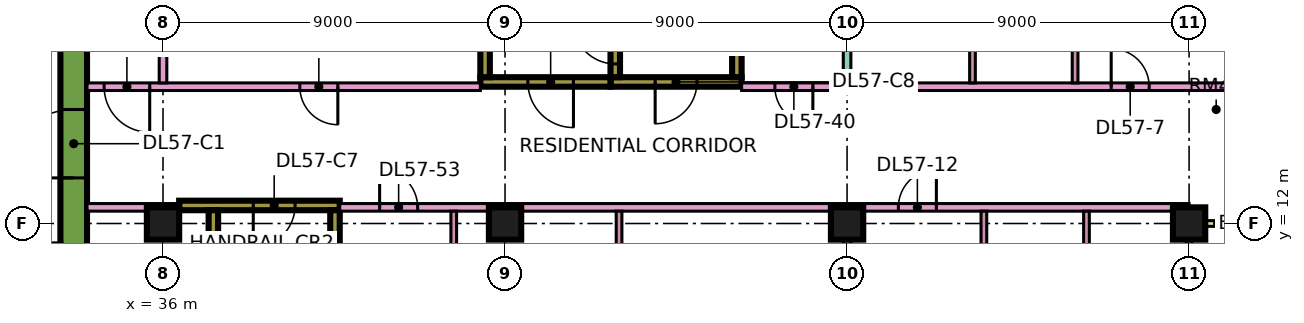
"""IFC4 building model, lengths in metres.
Left out: names, types, materials, properties, quantities, classifications, styles, units other than length and angle.
Written with IfcOpenShell. Run it as: python <this file> out.ifc"""

import sys

from ifc_helpers import new_model, si_unit, direction, frame, frame_2d, origin, origin_2d, place, context, subcontext, project, spatial, rectangle, extrude, element, fill, save


model = new_model("IFC4")
c1 = context("Model", 3, precision=1e-05, world=origin(), true_north=direction((0.0, 1.0)))
c2 = subcontext(c1, "Body", "Model", "MODEL_VIEW")
j1 = project(units=[si_unit("LENGTHUNIT", "METRE"), si_unit("PLANEANGLEUNIT", "RADIAN")], contexts=[c1])
p1 = place(None, origin())
s1 = spatial("IfcSite", under=j1, at=p1, CompositionType="ELEMENT")
p2 = place(p1, origin())
s2 = spatial("IfcBuilding", under=s1, at=p2, CompositionType="ELEMENT")
p3 = place(p2, frame((0.0, 0.0, 241.65)))
s3 = spatial("IfcBuildingStorey", under=s2, at=p3, CompositionType="ELEMENT", Elevation=241.65)
for number, where, z_axis, x_axis in (
    (1, (36.0, 12.0, 0.0), (0.0, 0.0, 1.0), (1.0, 0.0, 0.0)),
    (2, (45.0, 12.0, 0.0), (0.0, 0.0, 1.0), (1.0, 0.0, 0.0)),
    (3, (54.0, 12.0, 0.0), (0.0, 0.0, 1.0), (1.0, 0.0, 0.0)),
    (4, (63.0, 12.0, 0.0), (0.0, 0.0, 1.0), (1.0, 0.0, 0.0)),
):
    element("IfcColumn", number, at=place(p3, frame(where, z_axis=z_axis, x_axis=x_axis)), inside=s3, PredefinedType="COLUMN", context=c2, shape_type="SweptSolid", body=[
        extrude(rectangle(XDim=0.85, YDim=0.85, at=origin_2d()), origin(), (0.0, 0.0, 1.0), 3.75),
    ])
p4 = place(p3, frame((33.65, 7.7, 0.0), z_axis=(0.0, 0.0, 1.0), x_axis=(0.0, 1.0, 0.0)))
e5 = element("IfcWall", 5, at=p4, inside=s3, PredefinedType="SHEAR", context=c2, shape_type="SweptSolid", body=[
    extrude(rectangle(XDim=11.6, YDim=0.7, at=frame_2d((5.8, 0.0))), origin(), (0.0, 0.0, 1.0), 3.75),
])
p5 = place(p4, frame((5.5, 0.0, 0.0)))
e6 = element("IfcOpeningElement", 6, at=p5, cuts=e5, PredefinedType="OPENING", context=c2, shape_type="SweptSolid", body=[
    extrude(rectangle(XDim=1.8, YDim=2.4, at=frame_2d((0.9, 1.2))), frame((0.0, 0.36, 0.0), z_axis=(0.0, -1.0, 0.0), x_axis=(1.0, 0.0, 0.0)), (0.0, 0.0, 1.0), 0.72),
])
p6 = place(p3, frame((36.425, 12.475, 0.0), z_axis=(0.0, 0.0, 1.0), x_axis=(1.0, 0.0, 0.0)))
e7 = element("IfcWall", 7, at=p6, inside=s3, PredefinedType="SHEAR", context=c2, shape_type="SweptSolid", body=[
    extrude(rectangle(XDim=4.225, YDim=0.25, at=frame_2d((2.112, 0.0))), origin(), (0.0, 0.0, 1.0), 3.75),
])
p7 = place(p6, frame((1.95, 0.0, 0.0)))
e8 = element("IfcOpeningElement", 8, at=p7, cuts=e7, PredefinedType="OPENING", context=c2, shape_type="SweptSolid", body=[
    extrude(rectangle(XDim=1.1, YDim=2.2, at=frame_2d((0.55, 1.1))), frame((0.0, 0.135, 0.0), z_axis=(0.0, -1.0, 0.0), x_axis=(1.0, 0.0, 0.0)), (0.0, 0.0, 1.0), 0.27),
])
for number, where, z_axis, x_axis in (
    (9, (37.325, 5.85, 0.0), (0.0, 0.0, 1.0), (0.0, 1.0, 0.0)),
    (10, (40.525, 5.85, 0.0), (0.0, 0.0, 1.0), (0.0, 1.0, 0.0)),
):
    element("IfcWall", number, at=place(p3, frame(where, z_axis=z_axis, x_axis=x_axis)), inside=s3, PredefinedType="SHEAR", context=c2, shape_type="SweptSolid", body=[
        extrude(rectangle(XDim=6.5, YDim=0.25, at=frame_2d((3.25, 0.0))), origin(), (0.0, 0.0, 1.0), 3.75),
    ])
p8 = place(p3, frame((47.775, 15.725, 0.0), z_axis=(0.0, 0.0, 1.0), x_axis=(1.0, 0.0, 0.0)))
e11 = element("IfcWall", 11, at=p8, inside=s3, PredefinedType="SHEAR", context=c2, shape_type="SweptSolid", body=[
    extrude(rectangle(XDim=3.45, YDim=0.25, at=frame_2d((1.725, 0.0))), origin(), (0.0, 0.0, 1.0), 3.75),
])
p9 = place(p8, frame((1.175, 0.0, 0.0)))
e12 = element("IfcOpeningElement", 12, at=p9, cuts=e11, PredefinedType="OPENING", context=c2, shape_type="SweptSolid", body=[
    extrude(rectangle(XDim=1.1, YDim=2.2, at=frame_2d((0.55, 1.1))), frame((0.0, 0.135, 0.0), z_axis=(0.0, -1.0, 0.0), x_axis=(1.0, 0.0, 0.0)), (0.0, 0.0, 1.0), 0.27),
])
p10 = place(p3, frame((47.9, 15.85, 0.0), z_axis=(0.0, 0.0, 1.0), x_axis=(0.0, 1.0, 0.0)))
e13 = element("IfcWall", 13, at=p10, inside=s3, PredefinedType="SHEAR", context=c2, shape_type="SweptSolid", body=[
    extrude(rectangle(XDim=6.5, YDim=0.25, at=frame_2d((3.25, 0.0))), origin(), (0.0, 0.0, 1.0), 3.75),
])
p11 = place(p10, frame((0.35, 0.0, 0.0)))
e14 = element("IfcOpeningElement", 14, at=p11, cuts=e13, PredefinedType="OPENING", context=c2, shape_type="SweptSolid", body=[
    extrude(rectangle(XDim=1.1, YDim=2.2, at=frame_2d((0.55, 1.1))), frame((0.0, 0.135, 0.0), z_axis=(0.0, -1.0, 0.0), x_axis=(1.0, 0.0, 0.0)), (0.0, 0.0, 1.0), 0.27),
])
p12 = place(p3, frame((51.1, 15.85, 0.0), z_axis=(0.0, 0.0, 1.0), x_axis=(0.0, 1.0, 0.0)))
e15 = element("IfcWall", 15, at=p12, inside=s3, PredefinedType="SHEAR", context=c2, shape_type="SweptSolid", body=[
    extrude(rectangle(XDim=6.5, YDim=0.25, at=frame_2d((3.25, 0.0))), origin(), (0.0, 0.0, 1.0), 3.75),
])
p13 = place(p3, frame((44.35, 15.725, 0.0), z_axis=(0.0, 0.0, 1.0), x_axis=(1.0, 0.0, 0.0)))
e16 = element("IfcWall", 16, at=p13, inside=s3, PredefinedType="SHEAR", context=c2, shape_type="SweptSolid", body=[
    extrude(rectangle(XDim=3.425, YDim=0.25, at=frame_2d((1.712, 0.0))), origin(), (0.0, 0.0, 1.0), 3.75),
])
p14 = place(p13, frame((1.25, 0.0, 0.0)))
e17 = element("IfcOpeningElement", 17, at=p14, cuts=e16, PredefinedType="OPENING", context=c2, shape_type="SweptSolid", body=[
    extrude(rectangle(XDim=1.2, YDim=2.2, at=frame_2d((0.6, 1.1))), frame((0.0, 0.135, 0.0), z_axis=(0.0, -1.0, 0.0), x_axis=(1.0, 0.0, 0.0)), (0.0, 0.0, 1.0), 0.27),
])
p15 = place(p3, frame((44.475, 15.85, 0.0), z_axis=(0.0, 0.0, 1.0), x_axis=(0.0, 1.0, 0.0)))
e18 = element("IfcWall", 18, at=p15, inside=s3, PredefinedType="SHEAR", context=c2, shape_type="SweptSolid", body=[
    extrude(rectangle(XDim=6.5, YDim=0.25, at=frame_2d((3.25, 0.0))), origin(), (0.0, 0.0, 1.0), 3.75),
])
p16 = place(p15, frame((1.75, 0.0, 0.0)))
e19 = element("IfcOpeningElement", 19, at=p16, cuts=e18, PredefinedType="OPENING", context=c2, shape_type="SweptSolid", body=[
    extrude(rectangle(XDim=1.1, YDim=2.2, at=frame_2d((0.55, 1.1))), frame((0.0, 0.135, 0.0), z_axis=(0.0, -1.0, 0.0), x_axis=(1.0, 0.0, 0.0)), (0.0, 0.0, 1.0), 0.27),
])
p17 = place(p15, frame((4.3, 0.0, 0.0)))
e20 = element("IfcOpeningElement", 20, at=p17, cuts=e18, PredefinedType="OPENING", context=c2, shape_type="SweptSolid", body=[
    extrude(rectangle(XDim=1.1, YDim=2.2, at=frame_2d((0.55, 1.1))), frame((0.0, 0.135, 0.0), z_axis=(0.0, -1.0, 0.0), x_axis=(1.0, 0.0, 0.0)), (0.0, 0.0, 1.0), 0.27),
])
p18 = place(p3, frame((63.0, 1.575, 0.0), z_axis=(0.0, 0.0, 1.0), x_axis=(0.0, 1.0, 0.0)))
e21 = element("IfcWall", 21, at=p18, inside=s3, PredefinedType="SOLIDWALL", context=c2, shape_type="SweptSolid", body=[
    extrude(rectangle(XDim=10.35, YDim=0.15, at=frame_2d((5.175, 0.0))), origin(), (0.0, 0.0, 1.0), 3.35),
])
p19 = place(p18, frame((2.425, 0.0, 0.0)))
e22 = element("IfcOpeningElement", 22, at=p19, cuts=e21, PredefinedType="OPENING", context=c2, shape_type="SweptSolid", body=[
    extrude(rectangle(XDim=1.8, YDim=2.4, at=frame_2d((0.9, 1.2))), frame((0.0, 0.085, 0.0), z_axis=(0.0, -1.0, 0.0), x_axis=(1.0, 0.0, 0.0)), (0.0, 0.0, 1.0), 0.17),
])
p20 = place(p18, frame((7.075, 0.0, 0.45)))
e23 = element("IfcOpeningElement", 23, at=p20, cuts=e21, PredefinedType="OPENING", context=c2, shape_type="SweptSolid", body=[
    extrude(rectangle(XDim=2.4, YDim=2.4, at=frame_2d((1.2, 1.2))), frame((0.0, 0.085, 0.0), z_axis=(0.0, -1.0, 0.0), x_axis=(1.0, 0.0, 0.0)), (0.0, 0.0, 1.0), 0.17),
])
p21 = place(p3, frame((64.5, 12.0, 0.0), z_axis=(0.0, 0.0, 1.0), x_axis=(-1.0, 0.0, 0.0)))
e24 = element("IfcWall", 24, at=p21, inside=s3, PredefinedType="SOLIDWALL", context=c2, shape_type="SweptSolid", body=[
    extrude(rectangle(XDim=1.5, YDim=0.15, at=frame_2d((0.75, 0.0))), origin(), (0.0, 0.0, 1.0), 3.35),
])
p22 = place(p3, frame((34.0, 12.425, 0.0), z_axis=(0.0, 0.0, 1.0), x_axis=(1.0, 0.0, 0.0)))
e25 = element("IfcWall", 25, at=p22, inside=s3, PredefinedType="PARTITIONING", context=c2, shape_type="SweptSolid", body=[
    extrude(rectangle(XDim=2.426, YDim=0.2, at=frame_2d((1.213, 0.0))), origin(), (0.0, 0.0, 1.0), 3.35),
])
p23 = place(p3, frame((34.0, 15.6, 0.0), z_axis=(0.0, 0.0, 1.0), x_axis=(1.0, 0.0, 0.0)))
e26 = element("IfcWall", 26, at=p23, inside=s3, PredefinedType="PARTITIONING", context=c2, shape_type="SweptSolid", body=[
    extrude(rectangle(XDim=10.35, YDim=0.2, at=frame_2d((5.175, 0.0))), origin(), (0.0, 0.0, 1.0), 3.35),
])
p24 = place(p23, frame((5.6, 0.0, 0.0)))
e27 = element("IfcOpeningElement", 27, at=p24, cuts=e26, PredefinedType="OPENING", context=c2, shape_type="SweptSolid", body=[
    extrude(rectangle(XDim=1.0, YDim=2.1, at=frame_2d((0.5, 1.05))), frame((0.0, 0.11, 0.0), z_axis=(0.0, -1.0, 0.0), x_axis=(1.0, 0.0, 0.0)), (0.0, 0.0, 1.0), 0.22),
])
p25 = place(p23, frame((0.45, 0.0, 0.0)))
e28 = element("IfcOpeningElement", 28, at=p25, cuts=e26, PredefinedType="OPENING", context=c2, shape_type="SweptSolid", body=[
    extrude(rectangle(XDim=1.2, YDim=2.1, at=frame_2d((0.6, 1.05))), frame((0.0, 0.11, 0.0), z_axis=(0.0, -1.0, 0.0), x_axis=(1.0, 0.0, 0.0)), (0.0, 0.0, 1.0), 0.22),
])
p26 = place(p3, frame((36.0, 15.7, 0.0), z_axis=(0.0, 0.0, 1.0), x_axis=(0.0, 1.0, 0.0)))
e29 = element("IfcWall", 29, at=p26, inside=s3, PredefinedType="PARTITIONING", context=c2, shape_type="SweptSolid", body=[
    extrude(rectangle(XDim=8.3, YDim=0.2, at=frame_2d((4.15, 0.0))), origin(), (0.0, 0.0, 1.0), 3.35),
])
p27 = place(p3, frame((40.65, 12.425, 0.0), z_axis=(0.0, 0.0, 1.0), x_axis=(1.0, 0.0, 0.0)))
e30 = element("IfcWall", 30, at=p27, inside=s3, PredefinedType="PARTITIONING", context=c2, shape_type="SweptSolid", body=[
    extrude(rectangle(XDim=22.35, YDim=0.2, at=frame_2d((11.175, 0.0))), origin(), (0.0, 0.0, 1.0), 3.35),
])
p28 = place(p27, frame((14.7, 0.0, 0.0)))
e31 = element("IfcOpeningElement", 31, at=p28, cuts=e30, PredefinedType="OPENING", context=c2, shape_type="SweptSolid", body=[
    extrude(rectangle(XDim=1.0, YDim=2.1, at=frame_2d((0.5, 1.05))), frame((0.0, 0.11, 0.0), z_axis=(0.0, -1.0, 0.0), x_axis=(1.0, 0.0, 0.0)), (0.0, 0.0, 1.0), 0.22),
])
p29 = place(p27, frame((1.05, 0.0, 0.0)))
e32 = element("IfcOpeningElement", 32, at=p29, cuts=e30, PredefinedType="OPENING", context=c2, shape_type="SweptSolid", body=[
    extrude(rectangle(XDim=1.0, YDim=2.1, at=frame_2d((0.5, 1.05))), frame((0.0, 0.11, 0.0), z_axis=(0.0, -1.0, 0.0), x_axis=(1.0, 0.0, 0.0)), (0.0, 0.0, 1.0), 0.22),
])
p30 = place(p3, frame((43.65, 5.975, 0.0), z_axis=(0.0, 0.0, 1.0), x_axis=(0.0, 1.0, 0.0)))
e33 = element("IfcWall", 33, at=p30, inside=s3, PredefinedType="PARTITIONING", context=c2, shape_type="SweptSolid", body=[
    extrude(rectangle(XDim=6.35, YDim=0.15, at=frame_2d((3.175, 0.0))), origin(), (0.0, 0.0, 1.0), 3.35),
])
p31 = place(p30, frame((4.275, 0.0, 0.0)))
e34 = element("IfcOpeningElement", 34, at=p31, cuts=e33, PredefinedType="OPENING", context=c2, shape_type="SweptSolid", body=[
    extrude(rectangle(XDim=0.9, YDim=2.1, at=frame_2d((0.45, 1.05))), frame((0.0, 0.085, 0.0), z_axis=(0.0, -1.0, 0.0), x_axis=(1.0, 0.0, 0.0)), (0.0, 0.0, 1.0), 0.17),
])
p32 = place(p3, frame((48.0, 5.975, 0.0), z_axis=(0.0, 0.0, 1.0), x_axis=(0.0, 1.0, 0.0)))
e35 = element("IfcWall", 35, at=p32, inside=s3, PredefinedType="PARTITIONING", context=c2, shape_type="SweptSolid", body=[
    extrude(rectangle(XDim=6.35, YDim=0.15, at=frame_2d((3.175, 0.0))), origin(), (0.0, 0.0, 1.0), 3.35),
])
p33 = place(p3, frame((51.225, 15.6, 0.0), z_axis=(0.0, 0.0, 1.0), x_axis=(1.0, 0.0, 0.0)))
e36 = element("IfcWall", 36, at=p33, inside=s3, PredefinedType="PARTITIONING", context=c2, shape_type="SweptSolid", body=[
    extrude(rectangle(XDim=13.125, YDim=0.2, at=frame_2d((6.562, 0.0))), origin(), (0.0, 0.0, 1.0), 3.35),
])
p34 = place(p33, frame((9.725, 0.0, 0.0)))
e37 = element("IfcOpeningElement", 37, at=p34, cuts=e36, PredefinedType="OPENING", context=c2, shape_type="SweptSolid", body=[
    extrude(rectangle(XDim=1.0, YDim=2.1, at=frame_2d((0.5, 1.05))), frame((0.0, 0.11, 0.0), z_axis=(0.0, -1.0, 0.0), x_axis=(1.0, 0.0, 0.0)), (0.0, 0.0, 1.0), 0.22),
])
p35 = place(p33, frame((0.875, 0.0, 0.0)))
e38 = element("IfcOpeningElement", 38, at=p35, cuts=e36, PredefinedType="OPENING", context=c2, shape_type="SweptSolid", body=[
    extrude(rectangle(XDim=1.0, YDim=2.1, at=frame_2d((0.5, 1.05))), frame((0.0, 0.11, 0.0), z_axis=(0.0, -1.0, 0.0), x_axis=(1.0, 0.0, 0.0)), (0.0, 0.0, 1.0), 0.22),
])
p36 = place(p3, frame((54.0, 0.074, 0.0), z_axis=(0.0, 0.0, 1.0), x_axis=(0.0, 1.0, 0.0)))
e39 = element("IfcWall", 39, at=p36, inside=s3, PredefinedType="PARTITIONING", context=c2, shape_type="SweptSolid", body=[
    extrude(rectangle(XDim=12.251, YDim=0.2, at=frame_2d((6.125, 0.0))), origin(), (0.0, 0.0, 1.0), 3.35),
])
p37 = place(p3, frame((54.0, 15.7, 0.0), z_axis=(0.0, 0.0, 1.0), x_axis=(0.0, 1.0, 0.0)))
e40 = element("IfcWall", 40, at=p37, inside=s3, PredefinedType="PARTITIONING", context=c2, shape_type="SweptSolid", body=[
    extrude(rectangle(XDim=8.226, YDim=0.2, at=frame_2d((4.113, 0.0))), origin(), (0.0, 0.0, 1.0), 3.35),
])
p38 = place(p3, frame((57.3, 15.7, 0.0), z_axis=(0.0, 0.0, 1.0), x_axis=(0.0, 1.0, 0.0)))
e41 = element("IfcWall", 41, at=p38, inside=s3, PredefinedType="PARTITIONING", context=c2, shape_type="SweptSolid", body=[
    extrude(rectangle(XDim=3.125, YDim=0.15, at=frame_2d((1.562, 0.0))), origin(), (0.0, 0.0, 1.0), 3.35),
])
p39 = place(p3, frame((57.6, 8.3, 0.0), z_axis=(0.0, 0.0, 1.0), x_axis=(0.0, 1.0, 0.0)))
e42 = element("IfcWall", 42, at=p39, inside=s3, PredefinedType="PARTITIONING", context=c2, shape_type="SweptSolid", body=[
    extrude(rectangle(XDim=4.025, YDim=0.15, at=frame_2d((2.012, 0.0))), origin(), (0.0, 0.0, 1.0), 3.35),
])
p40 = place(p3, frame((60.0, 15.7, 0.0), z_axis=(0.0, 0.0, 1.0), x_axis=(0.0, 1.0, 0.0)))
e43 = element("IfcWall", 43, at=p40, inside=s3, PredefinedType="PARTITIONING", context=c2, shape_type="SweptSolid", body=[
    extrude(rectangle(XDim=3.125, YDim=0.15, at=frame_2d((1.562, 0.0))), origin(), (0.0, 0.0, 1.0), 3.35),
])
p41 = place(p40, frame((1.2, 0.0, 0.0)))
e44 = element("IfcOpeningElement", 44, at=p41, cuts=e43, PredefinedType="OPENING", context=c2, shape_type="SweptSolid", body=[
    extrude(rectangle(XDim=0.8, YDim=2.1, at=frame_2d((0.4, 1.05))), frame((0.0, 0.085, 0.0), z_axis=(0.0, -1.0, 0.0), x_axis=(1.0, 0.0, 0.0)), (0.0, 0.0, 1.0), 0.17),
])
p42 = place(p3, frame((60.3, 8.3, 0.0), z_axis=(0.0, 0.0, 1.0), x_axis=(0.0, 1.0, 0.0)))
e45 = element("IfcWall", 45, at=p42, inside=s3, PredefinedType="PARTITIONING", context=c2, shape_type="SweptSolid", body=[
    extrude(rectangle(XDim=4.025, YDim=0.15, at=frame_2d((2.012, 0.0))), origin(), (0.0, 0.0, 1.0), 3.35),
])
p43 = place(p5, origin())
e46 = element("IfcDoor", 46, at=p43, inside=s3, OperationType="DOUBLE_DOOR_SINGLE_SWING", PredefinedType="DOOR", context=c2, shape_type="SweptSolid", body=[
    extrude(rectangle(XDim=1.8, YDim=2.4, at=frame_2d((0.9, 1.2))), frame((0.0, 0.025, 0.0), z_axis=(0.0, -1.0, 0.0), x_axis=(1.0, 0.0, 0.0)), (0.0, 0.0, 1.0), 0.05),
])
fill(e6, e46)
p44 = place(p7, frame((1.1, 0.0, 0.0), z_axis=(0.0, 0.0, 1.0), x_axis=(-1.0, 0.0, 0.0)))
e47 = element("IfcDoor", 47, at=p44, inside=s3, OperationType="SINGLE_SWING_LEFT", PredefinedType="DOOR", context=c2, shape_type="SweptSolid", body=[
    extrude(rectangle(XDim=1.1, YDim=2.2, at=frame_2d((0.55, 1.1))), frame((0.0, 0.025, 0.0), z_axis=(0.0, -1.0, 0.0), x_axis=(1.0, 0.0, 0.0)), (0.0, 0.0, 1.0), 0.05),
])
fill(e8, e47)
p45 = place(p9, frame((1.1, 0.0, 0.0), z_axis=(0.0, 0.0, 1.0), x_axis=(-1.0, 0.0, 0.0)))
e48 = element("IfcDoor", 48, at=p45, inside=s3, OperationType="SINGLE_SWING_LEFT", PredefinedType="DOOR", context=c2, shape_type="SweptSolid", body=[
    extrude(rectangle(XDim=1.1, YDim=2.2, at=frame_2d((0.55, 1.1))), frame((0.0, 0.025, 0.0), z_axis=(0.0, -1.0, 0.0), x_axis=(1.0, 0.0, 0.0)), (0.0, 0.0, 1.0), 0.05),
])
fill(e12, e48)
p46 = place(p14, origin())
e49 = element("IfcDoor", 49, at=p46, inside=s3, OperationType="SINGLE_SWING_RIGHT", PredefinedType="DOOR", context=c2, shape_type="SweptSolid", body=[
    extrude(rectangle(XDim=1.2, YDim=2.2, at=frame_2d((0.6, 1.1))), frame((0.0, 0.025, 0.0), z_axis=(0.0, -1.0, 0.0), x_axis=(1.0, 0.0, 0.0)), (0.0, 0.0, 1.0), 0.05),
])
fill(e17, e49)
p47 = place(p11, frame((1.1, 0.0, 0.0), z_axis=(0.0, 0.0, 1.0), x_axis=(-1.0, 0.0, 0.0)))
e50 = element("IfcDoor", 50, at=p47, inside=s3, OperationType="SINGLE_SWING_RIGHT", PredefinedType="DOOR", context=c2, shape_type="SweptSolid", body=[
    extrude(rectangle(XDim=1.1, YDim=2.2, at=frame_2d((0.55, 1.1))), frame((0.0, 0.025, 0.0), z_axis=(0.0, -1.0, 0.0), x_axis=(1.0, 0.0, 0.0)), (0.0, 0.0, 1.0), 0.05),
])
fill(e14, e50)
p48 = place(p24, origin())
e51 = element("IfcDoor", 51, at=p48, inside=s3, OperationType="SINGLE_SWING_RIGHT", PredefinedType="DOOR", context=c2, shape_type="SweptSolid", body=[
    extrude(rectangle(XDim=1.0, YDim=2.1, at=frame_2d((0.5, 1.05))), frame((0.0, 0.025, 0.0), z_axis=(0.0, -1.0, 0.0), x_axis=(1.0, 0.0, 0.0)), (0.0, 0.0, 1.0), 0.05),
])
fill(e27, e51)
p49 = place(p34, origin())
e52 = element("IfcDoor", 52, at=p49, inside=s3, OperationType="SINGLE_SWING_LEFT", PredefinedType="DOOR", context=c2, shape_type="SweptSolid", body=[
    extrude(rectangle(XDim=1.0, YDim=2.1, at=frame_2d((0.5, 1.05))), frame((0.0, 0.025, 0.0), z_axis=(0.0, -1.0, 0.0), x_axis=(1.0, 0.0, 0.0)), (0.0, 0.0, 1.0), 0.05),
])
fill(e37, e52)
p50 = place(p28, frame((1.0, 0.0, 0.0), z_axis=(0.0, 0.0, 1.0), x_axis=(-1.0, 0.0, 0.0)))
e53 = element("IfcDoor", 53, at=p50, inside=s3, OperationType="SINGLE_SWING_RIGHT", PredefinedType="DOOR", context=c2, shape_type="SweptSolid", body=[
    extrude(rectangle(XDim=1.0, YDim=2.1, at=frame_2d((0.5, 1.05))), frame((0.0, 0.025, 0.0), z_axis=(0.0, -1.0, 0.0), x_axis=(1.0, 0.0, 0.0)), (0.0, 0.0, 1.0), 0.05),
])
fill(e31, e53)
p51 = place(p25, origin())
e54 = element("IfcDoor", 54, at=p51, inside=s3, OperationType="SINGLE_SWING_RIGHT", PredefinedType="DOOR", context=c2, shape_type="SweptSolid", body=[
    extrude(rectangle(XDim=1.2, YDim=2.1, at=frame_2d((0.6, 1.05))), frame((0.0, 0.025, 0.0), z_axis=(0.0, -1.0, 0.0), x_axis=(1.0, 0.0, 0.0)), (0.0, 0.0, 1.0), 0.05),
])
fill(e28, e54)
p52 = place(p35, origin())
e55 = element("IfcDoor", 55, at=p52, inside=s3, OperationType="SINGLE_SWING_RIGHT", PredefinedType="DOOR", context=c2, shape_type="SweptSolid", body=[
    extrude(rectangle(XDim=1.0, YDim=2.1, at=frame_2d((0.5, 1.05))), frame((0.0, 0.025, 0.0), z_axis=(0.0, -1.0, 0.0), x_axis=(1.0, 0.0, 0.0)), (0.0, 0.0, 1.0), 0.05),
])
fill(e38, e55)
p53 = place(p29, origin())
e56 = element("IfcDoor", 56, at=p53, inside=s3, OperationType="SINGLE_SWING_LEFT", PredefinedType="DOOR", context=c2, shape_type="SweptSolid", body=[
    extrude(rectangle(XDim=1.0, YDim=2.1, at=frame_2d((0.5, 1.05))), frame((0.0, 0.025, 0.0), z_axis=(0.0, -1.0, 0.0), x_axis=(1.0, 0.0, 0.0)), (0.0, 0.0, 1.0), 0.05),
])
fill(e32, e56)
save(model, sys.argv[1])
